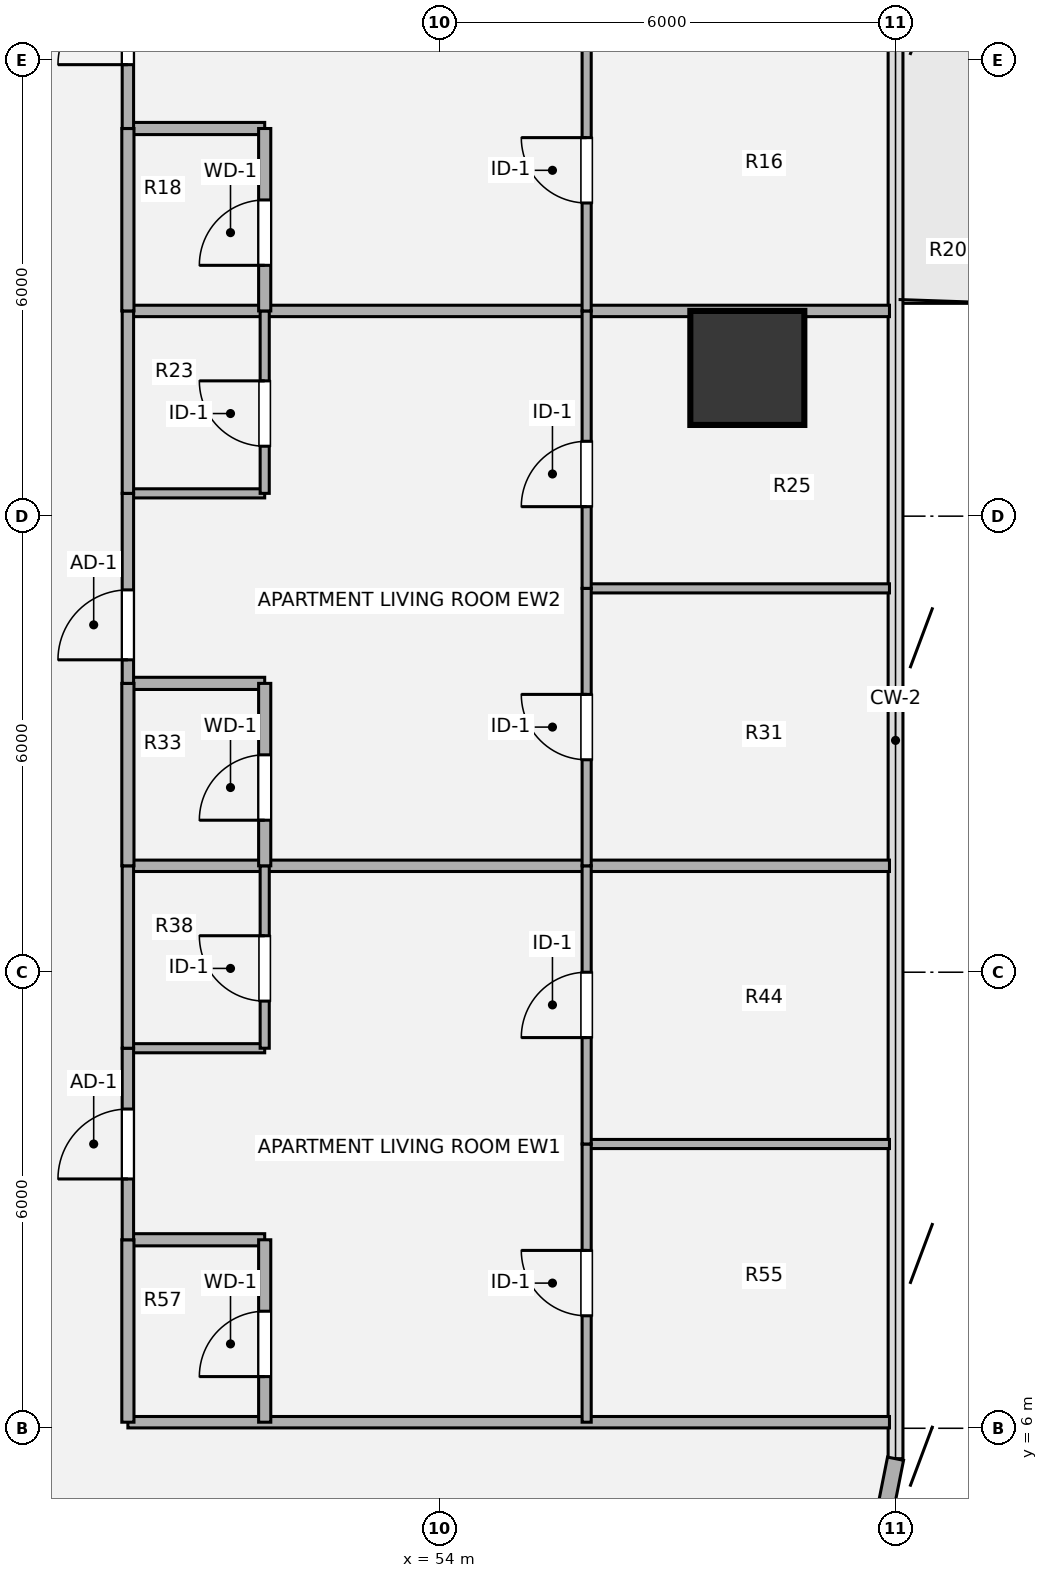
"""IFC4 building model, lengths in metres.
Left out: names, types, materials, properties, quantities, classifications, styles, units other than length and angle.
Written with IfcOpenShell. Run it as: python <this file> out.ifc"""

import sys

from ifc_helpers import new_model, si_unit, direction, frame, frame_2d, origin, origin_2d, place, context, subcontext, project, spatial, rectangle, hollow_circle, extrude, source, transform, mapped, element, fill, save


model = new_model("IFC4")
c1 = context("Model", 3, precision=1e-05, world=origin(), true_north=direction((0.0, 1.0)))
c2 = subcontext(c1, "Body", "Model", "MODEL_VIEW")
j1 = project(units=[si_unit("LENGTHUNIT", "METRE"), si_unit("PLANEANGLEUNIT", "RADIAN")], contexts=[c1])
p1 = place(None, origin())
s1 = spatial("IfcSite", under=j1, at=p1, CompositionType="ELEMENT")
p2 = place(p1, origin())
s2 = spatial("IfcBuilding", under=s1, at=p2, CompositionType="ELEMENT")
p3 = place(p2, frame((0.0, 0.0, 34.56)))
s3 = spatial("IfcBuildingStorey", under=s2, at=p3, CompositionType="ELEMENT", Elevation=34.56)
m1 = source(origin(), c2, "Body", "SweptSolid", [
    extrude(hollow_circle(Radius=0.75, WallThickness=0.05, at=origin_2d()), origin(), (0.0, 0.0, 1.0), 3.78),
])
p4 = place(p3, frame((58.05, 19.95, 0.0), z_axis=(0.0, 0.0, 1.0), x_axis=(1.0, 0.0, 0.0)))
e1 = element("IfcColumn", 1, at=p4, inside=s3, PredefinedType="COLUMN", context=c2, shape_type="MappedRepresentation", body=[
    mapped(m1, transform((0.0, 0.0, 0.0), x_axis=(1.0, 0.0, 0.0), y_axis=(0.0, 1.0, 0.0), z_axis=(0.0, 0.0, 1.0), scale=1.0)),
])
p5 = place(p3, frame((60.0, 5.6, 0.0), z_axis=(0.0, 0.0, 1.0), x_axis=(-0.195138390419, -0.980775717779, 0.0)))
e2 = element("IfcWall", 2, at=p5, inside=s3, PredefinedType="SOLIDWALL", context=c2, shape_type="SweptSolid", body=[
    extrude(rectangle(XDim=1.249, YDim=0.215, at=frame_2d((0.624, 0.0))), origin(), (0.0, 0.0, 1.0), 3.53),
])
p6 = place(p3, frame((49.9, 6.08, 0.0), z_axis=(0.0, 0.0, 1.0), x_axis=(1.0, 0.0, 0.0)))
e3 = element("IfcWall", 3, at=p6, inside=s3, PredefinedType="PARTITIONING", context=c2, shape_type="SweptSolid", body=[
    extrude(rectangle(XDim=10.02, YDim=0.15, at=frame_2d((5.01, 0.0))), origin(), (0.0, 0.0, 1.0), 3.5),
])
p7 = place(p3, frame((49.9, 8.48, 0.0), z_axis=(0.0, 0.0, 1.0), x_axis=(1.0, 0.0, 0.0)))
e4 = element("IfcWall", 4, at=p7, inside=s3, PredefinedType="PLUMBINGWALL", context=c2, shape_type="SweptSolid", body=[
    extrude(rectangle(XDim=1.8, YDim=0.16, at=frame_2d((0.9, 0.0))), origin(), (0.0, 0.0, 1.0), 3.5),
])
p8 = place(p3, frame((55.936, 9.74, 0.0), z_axis=(0.0, 0.0, 1.0), x_axis=(1.0, 0.0, 0.0)))
e5 = element("IfcWall", 5, at=p8, inside=s3, PredefinedType="PARTITIONING", context=c2, shape_type="SweptSolid", body=[
    extrude(rectangle(XDim=3.984, YDim=0.12, at=frame_2d((1.992, 0.0))), origin(), (0.0, 0.0, 1.0), 3.5),
])
p9 = place(p3, frame((49.9, 11.0, 0.0), z_axis=(0.0, 0.0, 1.0), x_axis=(1.0, 0.0, 0.0)))
e6 = element("IfcWall", 6, at=p9, inside=s3, PredefinedType="PARTITIONING", context=c2, shape_type="SweptSolid", body=[
    extrude(rectangle(XDim=1.8, YDim=0.12, at=frame_2d((0.9, 0.0))), origin(), (0.0, 0.0, 1.0), 3.5),
])
p10 = place(p3, frame((49.9, 13.4, 0.0), z_axis=(0.0, 0.0, 1.0), x_axis=(1.0, 0.0, 0.0)))
e7 = element("IfcWall", 7, at=p10, inside=s3, PredefinedType="PARTITIONING", context=c2, shape_type="SweptSolid", body=[
    extrude(rectangle(XDim=10.02, YDim=0.15, at=frame_2d((5.01, 0.0))), origin(), (0.0, 0.0, 1.0), 3.5),
])
p11 = place(p3, frame((49.9, 15.8, 0.0), z_axis=(0.0, 0.0, 1.0), x_axis=(1.0, 0.0, 0.0)))
e8 = element("IfcWall", 8, at=p11, inside=s3, PredefinedType="PLUMBINGWALL", context=c2, shape_type="SweptSolid", body=[
    extrude(rectangle(XDim=1.8, YDim=0.16, at=frame_2d((0.9, 0.0))), origin(), (0.0, 0.0, 1.0), 3.5),
])
p12 = place(p3, frame((55.936, 17.05, 0.0), z_axis=(0.0, 0.0, 1.0), x_axis=(1.0, 0.0, 0.0)))
e9 = element("IfcWall", 9, at=p12, inside=s3, PredefinedType="PARTITIONING", context=c2, shape_type="SweptSolid", body=[
    extrude(rectangle(XDim=3.984, YDim=0.12, at=frame_2d((1.992, 0.0))), origin(), (0.0, 0.0, 1.0), 3.5),
])
p13 = place(p3, frame((49.9, 18.3, 0.0), z_axis=(0.0, 0.0, 1.0), x_axis=(1.0, 0.0, 0.0)))
e10 = element("IfcWall", 10, at=p13, inside=s3, PredefinedType="PARTITIONING", context=c2, shape_type="SweptSolid", body=[
    extrude(rectangle(XDim=1.8, YDim=0.12, at=frame_2d((0.9, 0.0))), origin(), (0.0, 0.0, 1.0), 2.715),
])
p14 = place(p3, frame((49.9, 20.7, 0.0), z_axis=(0.0, 0.0, 1.0), x_axis=(1.0, 0.0, 0.0)))
e11 = element("IfcWall", 11, at=p14, inside=s3, PredefinedType="PARTITIONING", context=c2, shape_type="SweptSolid", body=[
    extrude(rectangle(XDim=10.02, YDim=0.15, at=frame_2d((5.01, 0.0))), origin(), (0.0, 0.0, 1.0), 2.982),
])
p15 = place(p3, frame((49.9, 23.1, 0.0), z_axis=(0.0, 0.0, 1.0), x_axis=(1.0, 0.0, 0.0)))
e12 = element("IfcWall", 12, at=p15, inside=s3, PredefinedType="PLUMBINGWALL", context=c2, shape_type="SweptSolid", body=[
    extrude(rectangle(XDim=1.8, YDim=0.16, at=frame_2d((0.9, 0.0))), origin(), (0.0, 0.0, 1.0), 3.055),
])
p16 = place(p3, frame((49.9, 6.08, 0.0), z_axis=(0.0, 0.0, 1.0), x_axis=(0.0, 1.0, 0.0)))
e13 = element("IfcWall", 13, at=p16, inside=s3, PredefinedType="PLUMBINGWALL", context=c2, shape_type="SweptSolid", body=[
    extrude(rectangle(XDim=2.4, YDim=0.16, at=frame_2d((1.2, 0.0))), origin(), (0.0, 0.0, 1.0), 3.5),
])
p17 = place(p3, frame((49.9, 8.48, 0.0), z_axis=(0.0, 0.0, 1.0), x_axis=(0.0, 1.0, 0.0)))
e14 = element("IfcWall", 14, at=p17, inside=s3, PredefinedType="PARTITIONING", context=c2, shape_type="SweptSolid", body=[
    extrude(rectangle(XDim=2.52, YDim=0.15, at=frame_2d((1.26, 0.0))), origin(), (0.0, 0.0, 1.0), 3.5),
])
p18 = place(p17, frame((0.8, 0.0, 0.0)))
e15 = element("IfcOpeningElement", 15, at=p18, cuts=e14, PredefinedType="OPENING", context=c2, shape_type="SweptSolid", body=[
    extrude(rectangle(XDim=0.92, YDim=2.1, at=origin_2d()), frame((0.46, 0.085, 1.05), z_axis=(0.0, -1.0, 0.0), x_axis=(1.0, 0.0, 0.0)), (0.0, 0.0, 1.0), 0.17),
])
p19 = place(p3, frame((49.9, 11.0, 0.0), z_axis=(0.0, 0.0, 1.0), x_axis=(0.0, 1.0, 0.0)))
e16 = element("IfcWall", 16, at=p19, inside=s3, PredefinedType="PARTITIONING", context=c2, shape_type="SweptSolid", body=[
    extrude(rectangle(XDim=2.4, YDim=0.15, at=frame_2d((1.2, 0.0))), origin(), (0.0, 0.0, 1.0), 3.5),
])
p20 = place(p3, frame((49.9, 13.4, 0.0), z_axis=(0.0, 0.0, 1.0), x_axis=(0.0, 1.0, 0.0)))
e17 = element("IfcWall", 17, at=p20, inside=s3, PredefinedType="PLUMBINGWALL", context=c2, shape_type="SweptSolid", body=[
    extrude(rectangle(XDim=2.4, YDim=0.16, at=frame_2d((1.2, 0.0))), origin(), (0.0, 0.0, 1.0), 3.5),
])
p21 = place(p3, frame((49.9, 15.8, 0.0), z_axis=(0.0, 0.0, 1.0), x_axis=(0.0, 1.0, 0.0)))
e18 = element("IfcWall", 18, at=p21, inside=s3, PredefinedType="PARTITIONING", context=c2, shape_type="SweptSolid", body=[
    extrude(rectangle(XDim=2.5, YDim=0.15, at=frame_2d((1.25, 0.0))), origin(), (0.0, 0.0, 1.0), 3.5),
])
p22 = place(p21, frame((0.31, 0.0, 0.0)))
e19 = element("IfcOpeningElement", 19, at=p22, cuts=e18, PredefinedType="OPENING", context=c2, shape_type="SweptSolid", body=[
    extrude(rectangle(XDim=0.92, YDim=2.1, at=origin_2d()), frame((0.46, 0.085, 1.05), z_axis=(0.0, -1.0, 0.0), x_axis=(1.0, 0.0, 0.0)), (0.0, 0.0, 1.0), 0.17),
])
p23 = place(p3, frame((49.9, 18.3, 0.0), z_axis=(0.0, 0.0, 1.0), x_axis=(0.0, 1.0, 0.0)))
e20 = element("IfcWall", 20, at=p23, inside=s3, PredefinedType="PARTITIONING", context=c2, shape_type="SweptSolid", body=[
    extrude(rectangle(XDim=2.4, YDim=0.15, at=frame_2d((1.2, 0.0))), origin(), (0.0, 0.0, 1.0), 3.5),
])
p24 = place(p3, frame((49.9, 20.7, 0.0), z_axis=(0.0, 0.0, 1.0), x_axis=(0.0, 1.0, 0.0)))
e21 = element("IfcWall", 21, at=p24, inside=s3, PredefinedType="PLUMBINGWALL", context=c2, shape_type="SweptSolid", body=[
    extrude(rectangle(XDim=2.4, YDim=0.16, at=frame_2d((1.2, 0.0))), origin(), (0.0, 0.0, 1.0), 3.5),
])
p25 = place(p3, frame((49.9, 23.1, 0.0), z_axis=(0.0, 0.0, 1.0), x_axis=(0.0, 1.0, 0.0)))
e22 = element("IfcWall", 22, at=p25, inside=s3, PredefinedType="PARTITIONING", context=c2, shape_type="SweptSolid", body=[
    extrude(rectangle(XDim=2.6, YDim=0.15, at=frame_2d((1.3, 0.0))), origin(), (0.0, 0.0, 1.0), 3.5),
])
p26 = place(p25, frame((0.84, 0.0, 0.0)))
e23 = element("IfcOpeningElement", 23, at=p26, cuts=e22, PredefinedType="OPENING", context=c2, shape_type="SweptSolid", body=[
    extrude(rectangle(XDim=0.92, YDim=2.1, at=origin_2d()), frame((0.46, 0.085, 1.05), z_axis=(0.0, -1.0, 0.0), x_axis=(1.0, 0.0, 0.0)), (0.0, 0.0, 1.0), 0.17),
])
p27 = place(p3, frame((51.7, 6.08, 0.0), z_axis=(0.0, 0.0, 1.0), x_axis=(0.0, 1.0, 0.0)))
e24 = element("IfcWall", 24, at=p27, inside=s3, PredefinedType="PLUMBINGWALL", context=c2, shape_type="SweptSolid", body=[
    extrude(rectangle(XDim=2.4, YDim=0.16, at=frame_2d((1.2, 0.0))), origin(), (0.0, 0.0, 1.0), 3.5),
])
p28 = place(p27, frame((0.6, 0.0, 0.0)))
e25 = element("IfcOpeningElement", 25, at=p28, cuts=e24, PredefinedType="OPENING", context=c2, shape_type="SweptSolid", body=[
    extrude(rectangle(XDim=0.86, YDim=2.1, at=origin_2d()), frame((0.43, 0.09, 1.05), z_axis=(0.0, -1.0, 0.0), x_axis=(1.0, 0.0, 0.0)), (0.0, 0.0, 1.0), 0.18),
])
p29 = place(p3, frame((51.7, 11.0, 0.0), z_axis=(0.0, 0.0, 1.0), x_axis=(0.0, 1.0, 0.0)))
e26 = element("IfcWall", 26, at=p29, inside=s3, PredefinedType="PARTITIONING", context=c2, shape_type="SweptSolid", body=[
    extrude(rectangle(XDim=2.4, YDim=0.12, at=frame_2d((1.2, 0.0))), origin(), (0.0, 0.0, 1.0), 3.5),
])
p30 = place(p29, frame((0.62, 0.0, 0.0)))
e27 = element("IfcOpeningElement", 27, at=p30, cuts=e26, PredefinedType="OPENING", context=c2, shape_type="SweptSolid", body=[
    extrude(rectangle(XDim=0.86, YDim=2.1, at=origin_2d()), frame((0.43, 0.07, 1.05), z_axis=(0.0, -1.0, 0.0), x_axis=(1.0, 0.0, 0.0)), (0.0, 0.0, 1.0), 0.14),
])
p31 = place(p3, frame((51.7, 13.4, 0.0), z_axis=(0.0, 0.0, 1.0), x_axis=(0.0, 1.0, 0.0)))
e28 = element("IfcWall", 28, at=p31, inside=s3, PredefinedType="PLUMBINGWALL", context=c2, shape_type="SweptSolid", body=[
    extrude(rectangle(XDim=2.4, YDim=0.16, at=frame_2d((1.2, 0.0))), origin(), (0.0, 0.0, 1.0), 3.5),
])
p32 = place(p31, frame((0.6, 0.0, 0.0)))
e29 = element("IfcOpeningElement", 29, at=p32, cuts=e28, PredefinedType="OPENING", context=c2, shape_type="SweptSolid", body=[
    extrude(rectangle(XDim=0.86, YDim=2.1, at=origin_2d()), frame((0.43, 0.09, 1.05), z_axis=(0.0, -1.0, 0.0), x_axis=(1.0, 0.0, 0.0)), (0.0, 0.0, 1.0), 0.18),
])
p33 = place(p3, frame((51.7, 18.3, 0.0), z_axis=(0.0, 0.0, 1.0), x_axis=(0.0, 1.0, 0.0)))
e30 = element("IfcWall", 30, at=p33, inside=s3, PredefinedType="PARTITIONING", context=c2, shape_type="SweptSolid", body=[
    extrude(rectangle(XDim=2.4, YDim=0.12, at=frame_2d((1.2, 0.0))), origin(), (0.0, 0.0, 1.0), 3.5),
])
p34 = place(p33, frame((0.62, 0.0, 0.0)))
e31 = element("IfcOpeningElement", 31, at=p34, cuts=e30, PredefinedType="OPENING", context=c2, shape_type="SweptSolid", body=[
    extrude(rectangle(XDim=0.86, YDim=2.1, at=origin_2d()), frame((0.43, 0.07, 1.05), z_axis=(0.0, -1.0, 0.0), x_axis=(1.0, 0.0, 0.0)), (0.0, 0.0, 1.0), 0.14),
])
p35 = place(p3, frame((51.7, 20.7, 0.0), z_axis=(0.0, 0.0, 1.0), x_axis=(0.0, 1.0, 0.0)))
e32 = element("IfcWall", 32, at=p35, inside=s3, PredefinedType="PLUMBINGWALL", context=c2, shape_type="SweptSolid", body=[
    extrude(rectangle(XDim=2.4, YDim=0.16, at=frame_2d((1.2, 0.0))), origin(), (0.0, 0.0, 1.0), 3.5),
])
p36 = place(p35, frame((0.6, 0.0, 0.0)))
e33 = element("IfcOpeningElement", 33, at=p36, cuts=e32, PredefinedType="OPENING", context=c2, shape_type="SweptSolid", body=[
    extrude(rectangle(XDim=0.86, YDim=2.1, at=origin_2d()), frame((0.43, 0.09, 1.05), z_axis=(0.0, -1.0, 0.0), x_axis=(1.0, 0.0, 0.0)), (0.0, 0.0, 1.0), 0.18),
])
p37 = place(p3, frame((55.936, 6.08, 0.0), z_axis=(0.0, 0.0, 1.0), x_axis=(0.0, 1.0, 0.0)))
e34 = element("IfcWall", 34, at=p37, inside=s3, PredefinedType="PARTITIONING", context=c2, shape_type="SweptSolid", body=[
    extrude(rectangle(XDim=3.66, YDim=0.12, at=frame_2d((1.83, 0.0))), origin(), (0.0, 0.0, 1.0), 3.5),
])
p38 = place(p37, frame((1.4, 0.0, 0.0)))
e35 = element("IfcOpeningElement", 35, at=p38, cuts=e34, PredefinedType="OPENING", context=c2, shape_type="SweptSolid", body=[
    extrude(rectangle(XDim=0.86, YDim=2.1, at=origin_2d()), frame((0.43, 0.07, 1.05), z_axis=(0.0, -1.0, 0.0), x_axis=(1.0, 0.0, 0.0)), (0.0, 0.0, 1.0), 0.14),
])
p39 = place(p3, frame((55.936, 9.74, 0.0), z_axis=(0.0, 0.0, 1.0), x_axis=(0.0, 1.0, 0.0)))
e36 = element("IfcWall", 36, at=p39, inside=s3, PredefinedType="PARTITIONING", context=c2, shape_type="SweptSolid", body=[
    extrude(rectangle(XDim=3.66, YDim=0.12, at=frame_2d((1.83, 0.0))), origin(), (0.0, 0.0, 1.0), 3.5),
])
p40 = place(p39, frame((1.4, 0.0, 0.0)))
e37 = element("IfcOpeningElement", 37, at=p40, cuts=e36, PredefinedType="OPENING", context=c2, shape_type="SweptSolid", body=[
    extrude(rectangle(XDim=0.86, YDim=2.1, at=origin_2d()), frame((0.43, 0.07, 1.05), z_axis=(0.0, -1.0, 0.0), x_axis=(1.0, 0.0, 0.0)), (0.0, 0.0, 1.0), 0.14),
])
p41 = place(p3, frame((55.936, 13.4, 0.0), z_axis=(0.0, 0.0, 1.0), x_axis=(0.0, 1.0, 0.0)))
e38 = element("IfcWall", 38, at=p41, inside=s3, PredefinedType="PARTITIONING", context=c2, shape_type="SweptSolid", body=[
    extrude(rectangle(XDim=3.65, YDim=0.12, at=frame_2d((1.825, 0.0))), origin(), (0.0, 0.0, 1.0), 3.5),
])
p42 = place(p41, frame((1.395, 0.0, 0.0)))
e39 = element("IfcOpeningElement", 39, at=p42, cuts=e38, PredefinedType="OPENING", context=c2, shape_type="SweptSolid", body=[
    extrude(rectangle(XDim=0.86, YDim=2.1, at=origin_2d()), frame((0.43, 0.07, 1.05), z_axis=(0.0, -1.0, 0.0), x_axis=(1.0, 0.0, 0.0)), (0.0, 0.0, 1.0), 0.14),
])
p43 = place(p3, frame((55.936, 17.05, 0.0), z_axis=(0.0, 0.0, 1.0), x_axis=(0.0, 1.0, 0.0)))
e40 = element("IfcWall", 40, at=p43, inside=s3, PredefinedType="PARTITIONING", context=c2, shape_type="SweptSolid", body=[
    extrude(rectangle(XDim=3.65, YDim=0.12, at=frame_2d((1.825, 0.0))), origin(), (0.0, 0.0, 1.0), 3.5),
])
p44 = place(p43, frame((1.075, 0.0, 0.0)))
e41 = element("IfcOpeningElement", 41, at=p44, cuts=e40, PredefinedType="OPENING", context=c2, shape_type="SweptSolid", body=[
    extrude(rectangle(XDim=0.86, YDim=2.1, at=origin_2d()), frame((0.43, 0.07, 1.05), z_axis=(0.0, -1.0, 0.0), x_axis=(1.0, 0.0, 0.0)), (0.0, 0.0, 1.0), 0.14),
])
p45 = place(p3, frame((55.936, 20.7, 0.0), z_axis=(0.0, 0.0, 1.0), x_axis=(0.0, 1.0, 0.0)))
e42 = element("IfcWall", 42, at=p45, inside=s3, PredefinedType="PARTITIONING", context=c2, shape_type="SweptSolid", body=[
    extrude(rectangle(XDim=3.7, YDim=0.12, at=frame_2d((1.85, 0.0))), origin(), (0.0, 0.0, 1.0), 3.5),
])
p46 = place(p45, frame((1.42, 0.0, 0.0)))
e43 = element("IfcOpeningElement", 43, at=p46, cuts=e42, PredefinedType="OPENING", context=c2, shape_type="SweptSolid", body=[
    extrude(rectangle(XDim=0.86, YDim=2.1, at=origin_2d()), frame((0.43, 0.07, 1.05), z_axis=(0.0, -1.0, 0.0), x_axis=(1.0, 0.0, 0.0)), (0.0, 0.0, 1.0), 0.14),
])
m2 = source(origin(), c2, "Body", "SweptSolid", [
    extrude(rectangle(XDim=0.92, YDim=2.1, at=origin_2d()), frame((0.46, 0.025, 1.05), z_axis=(0.0, -1.0, 0.0), x_axis=(1.0, 0.0, 0.0)), (0.0, 0.0, 1.0), 0.05),
])
p47 = place(p18, origin())
e44 = element("IfcDoor", 44, at=p47, inside=s3, OperationType="SINGLE_SWING_LEFT", PredefinedType="DOOR", context=c2, shape_type="MappedRepresentation", body=[
    mapped(m2, transform((0.0, 0.0, 0.0), x_axis=(1.0, 0.0, 0.0), y_axis=(0.0, 1.0, 0.0), z_axis=(0.0, 0.0, 1.0), scale=1.0)),
])
fill(e15, e44)
p48 = place(p22, origin())
e45 = element("IfcDoor", 45, at=p48, inside=s3, OperationType="SINGLE_SWING_LEFT", PredefinedType="DOOR", context=c2, shape_type="MappedRepresentation", body=[
    mapped(m2, transform((0.0, 0.0, 0.0), x_axis=(1.0, 0.0, 0.0), y_axis=(0.0, 1.0, 0.0), z_axis=(0.0, 0.0, 1.0), scale=1.0)),
])
fill(e19, e45)
p49 = place(p26, origin())
e46 = element("IfcDoor", 46, at=p49, inside=s3, OperationType="SINGLE_SWING_LEFT", PredefinedType="DOOR", context=c2, shape_type="MappedRepresentation", body=[
    mapped(m2, transform((0.0, 0.0, 0.0), x_axis=(1.0, 0.0, 0.0), y_axis=(0.0, 1.0, 0.0), z_axis=(0.0, 0.0, 1.0), scale=1.0)),
])
fill(e23, e46)
m3 = source(origin(), c2, "Body", "SweptSolid", [
    extrude(rectangle(XDim=0.86, YDim=2.1, at=origin_2d()), frame((0.43, 0.025, 1.05), z_axis=(0.0, -1.0, 0.0), x_axis=(1.0, 0.0, 0.0)), (0.0, 0.0, 1.0), 0.05),
])
p50 = place(p28, origin())
e47 = element("IfcDoor", 47, at=p50, inside=s3, OperationType="SINGLE_SWING_LEFT", PredefinedType="DOOR", context=c2, shape_type="MappedRepresentation", body=[
    mapped(m3, transform((0.0, 0.0, 0.0), x_axis=(1.0, 0.0, 0.0), y_axis=(0.0, 1.0, 0.0), z_axis=(0.0, 0.0, 1.0), scale=1.0)),
])
fill(e25, e47)
m4 = source(origin(), c2, "Body", "SweptSolid", [
    extrude(rectangle(XDim=0.86, YDim=2.1, at=origin_2d()), frame((0.43, 0.025, 1.05), z_axis=(0.0, -1.0, 0.0), x_axis=(1.0, 0.0, 0.0)), (0.0, 0.0, 1.0), 0.05),
])
p51 = place(p30, origin())
e48 = element("IfcDoor", 48, at=p51, inside=s3, OperationType="SINGLE_SWING_RIGHT", PredefinedType="DOOR", context=c2, shape_type="MappedRepresentation", body=[
    mapped(m4, transform((0.0, 0.0, 0.0), x_axis=(1.0, 0.0, 0.0), y_axis=(0.0, 1.0, 0.0), z_axis=(0.0, 0.0, 1.0), scale=1.0)),
])
fill(e27, e48)
p52 = place(p32, origin())
e49 = element("IfcDoor", 49, at=p52, inside=s3, OperationType="SINGLE_SWING_LEFT", PredefinedType="DOOR", context=c2, shape_type="MappedRepresentation", body=[
    mapped(m3, transform((0.0, 0.0, 0.0), x_axis=(1.0, 0.0, 0.0), y_axis=(0.0, 1.0, 0.0), z_axis=(0.0, 0.0, 1.0), scale=1.0)),
])
fill(e29, e49)
p53 = place(p34, origin())
e50 = element("IfcDoor", 50, at=p53, inside=s3, OperationType="SINGLE_SWING_RIGHT", PredefinedType="DOOR", context=c2, shape_type="MappedRepresentation", body=[
    mapped(m4, transform((0.0, 0.0, 0.0), x_axis=(1.0, 0.0, 0.0), y_axis=(0.0, 1.0, 0.0), z_axis=(0.0, 0.0, 1.0), scale=1.0)),
])
fill(e31, e50)
p54 = place(p36, origin())
e51 = element("IfcDoor", 51, at=p54, inside=s3, OperationType="SINGLE_SWING_LEFT", PredefinedType="DOOR", context=c2, shape_type="MappedRepresentation", body=[
    mapped(m3, transform((0.0, 0.0, 0.0), x_axis=(1.0, 0.0, 0.0), y_axis=(0.0, 1.0, 0.0), z_axis=(0.0, 0.0, 1.0), scale=1.0)),
])
fill(e33, e51)
p55 = place(p38, origin())
e52 = element("IfcDoor", 52, at=p55, inside=s3, OperationType="SINGLE_SWING_RIGHT", PredefinedType="DOOR", context=c2, shape_type="MappedRepresentation", body=[
    mapped(m4, transform((0.0, 0.0, 0.0), x_axis=(1.0, 0.0, 0.0), y_axis=(0.0, 1.0, 0.0), z_axis=(0.0, 0.0, 1.0), scale=1.0)),
])
fill(e35, e52)
p56 = place(p40, origin())
e53 = element("IfcDoor", 53, at=p56, inside=s3, OperationType="SINGLE_SWING_LEFT", PredefinedType="DOOR", context=c2, shape_type="MappedRepresentation", body=[
    mapped(m4, transform((0.0, 0.0, 0.0), x_axis=(1.0, 0.0, 0.0), y_axis=(0.0, 1.0, 0.0), z_axis=(0.0, 0.0, 1.0), scale=1.0)),
])
fill(e37, e53)
p57 = place(p42, origin())
e54 = element("IfcDoor", 54, at=p57, inside=s3, OperationType="SINGLE_SWING_RIGHT", PredefinedType="DOOR", context=c2, shape_type="MappedRepresentation", body=[
    mapped(m4, transform((0.0, 0.0, 0.0), x_axis=(1.0, 0.0, 0.0), y_axis=(0.0, 1.0, 0.0), z_axis=(0.0, 0.0, 1.0), scale=1.0)),
])
fill(e39, e54)
p58 = place(p44, origin())
e55 = element("IfcDoor", 55, at=p58, inside=s3, OperationType="SINGLE_SWING_LEFT", PredefinedType="DOOR", context=c2, shape_type="MappedRepresentation", body=[
    mapped(m4, transform((0.0, 0.0, 0.0), x_axis=(1.0, 0.0, 0.0), y_axis=(0.0, 1.0, 0.0), z_axis=(0.0, 0.0, 1.0), scale=1.0)),
])
fill(e41, e55)
p59 = place(p46, origin())
e56 = element("IfcDoor", 56, at=p59, inside=s3, OperationType="SINGLE_SWING_RIGHT", PredefinedType="DOOR", context=c2, shape_type="MappedRepresentation", body=[
    mapped(m4, transform((0.0, 0.0, 0.0), x_axis=(1.0, 0.0, 0.0), y_axis=(0.0, 1.0, 0.0), z_axis=(0.0, 0.0, 1.0), scale=1.0)),
])
fill(e43, e56)
save(model, sys.argv[1])
